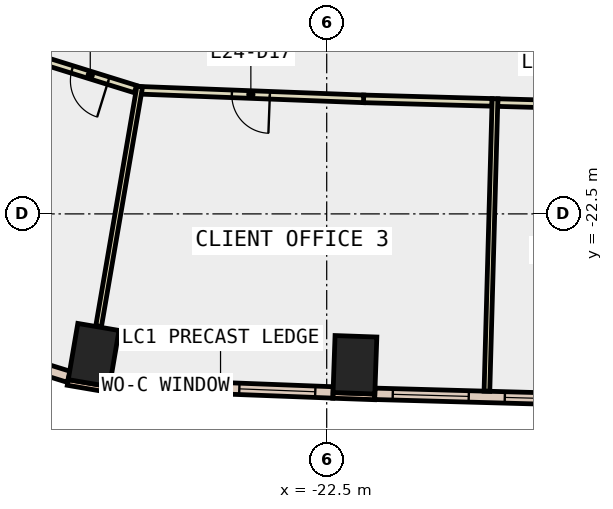
"""IFC4 building model, lengths in metres.
Left out: names, types, materials, properties, quantities, classifications, styles, units other than length and angle.
Written with IfcOpenShell. Run it as: python <this file> out.ifc"""

import sys

from ifc_helpers import new_model, si_unit, direction, frame, frame_2d, origin, origin_2d, place, context, subcontext, project, spatial, rectangle, extrude, element, fill, save


model = new_model("IFC4")
c1 = context("Model", 3, precision=1e-05, world=origin(), true_north=direction((0.0, 1.0)))
c2 = subcontext(c1, "Body", "Model", "MODEL_VIEW")
j1 = project(units=[si_unit("LENGTHUNIT", "METRE"), si_unit("PLANEANGLEUNIT", "RADIAN")], contexts=[c1])
p1 = place(None, origin())
s1 = spatial("IfcSite", under=j1, at=p1, CompositionType="ELEMENT")
p2 = place(p1, origin())
s2 = spatial("IfcBuilding", under=s1, at=p2, CompositionType="ELEMENT")
p3 = place(p2, frame((0.0, 0.0, 111.8)))
s3 = spatial("IfcBuildingStorey", under=s2, at=p3, CompositionType="ELEMENT", Elevation=111.8)
for number, where, z_axis, x_axis in (
    (1, (-28.633, -26.214, -0.4), (0.0, 0.0, 1.0), (-0.986, 0.168, 0.0)),
    (2, (-21.757, -26.47, -0.4), (0.0, 0.0, 1.0), (-0.999, 0.035, 0.0)),
):
    element("IfcColumn", number, at=place(p3, frame(where, z_axis=z_axis, x_axis=x_axis)), inside=s3, PredefinedType="COLUMN", context=c2, shape_type="SweptSolid", body=[
        extrude(rectangle(XDim=1.1, YDim=1.5, at=origin_2d()), origin(), (0.0, 0.0, 1.0), 4.2),
    ])
p4 = place(p3, frame((-29.314, -26.935, 0.0), z_axis=(0.0, 0.0, 1.0), x_axis=(0.985763338892, -0.168138751323, 0.0)))
e3 = element("IfcWall", 3, at=p4, inside=s3, PredefinedType="STANDARD", context=c2, shape_type="SweptSolid", body=[
    extrude(rectangle(XDim=1.101, YDim=0.15, at=frame_2d((0.55, 0.0))), origin(), (0.0, 0.0, 1.0), 3.8),
])
p5 = place(p3, frame((-22.336, -27.275, 0.0), z_axis=(0.0, 0.0, 1.0), x_axis=(0.999368780235, -0.035525217693, 0.0)))
e4 = element("IfcWall", 4, at=p5, inside=s3, PredefinedType="STANDARD", context=c2, shape_type="SweptSolid", body=[
    extrude(rectangle(XDim=1.1, YDim=0.15, at=frame_2d((0.55, 0.0))), origin(), (0.0, 0.0, 1.0), 3.8),
])
p6 = place(p3, frame((-28.205, -26.973, 0.0), z_axis=(0.0, 0.0, 1.0), x_axis=(0.999266319694, -0.03829911651, 0.0)))
e5 = element("IfcWall", 5, at=p6, inside=s3, PredefinedType="STANDARD", context=c2, shape_type="SweptSolid", body=[
    extrude(rectangle(XDim=5.877, YDim=0.3, at=frame_2d((2.939, 0.0))), origin(), (0.0, 0.0, 1.0), 3.8),
])
p7 = place(p6, frame((0.469, 0.0, 0.9)))
e6 = element("IfcOpeningElement", 6, at=p7, cuts=e5, PredefinedType="OPENING", context=c2, shape_type="SweptSolid", body=[
    extrude(rectangle(XDim=2.0, YDim=2.6, at=frame_2d((1.0, 1.3))), frame((0.0, 0.16, 0.0), z_axis=(0.0, -1.0, 0.0), x_axis=(1.0, 0.0, 0.0)), (0.0, 0.0, 1.0), 0.32),
])
p8 = place(p6, frame((3.408, 0.0, 0.9)))
e7 = element("IfcOpeningElement", 7, at=p8, cuts=e5, PredefinedType="OPENING", context=c2, shape_type="SweptSolid", body=[
    extrude(rectangle(XDim=2.0, YDim=2.6, at=frame_2d((1.0, 1.3))), frame((0.0, 0.16, 0.0), z_axis=(0.0, -1.0, 0.0), x_axis=(1.0, 0.0, 0.0)), (0.0, 0.0, 1.0), 0.32),
])
p9 = place(p3, frame((-21.235, -27.234, 0.0), z_axis=(0.0, 0.0, 1.0), x_axis=(0.999617542368, -0.027654456983, 0.0)))
e8 = element("IfcWall", 8, at=p9, inside=s3, PredefinedType="STANDARD", context=c2, shape_type="SweptSolid", body=[
    extrude(rectangle(XDim=5.897, YDim=0.3, at=frame_2d((2.949, 0.0))), origin(), (0.0, 0.0, 1.0), 3.8),
])
p10 = place(p9, frame((0.474, 0.0, 0.9)))
e9 = element("IfcOpeningElement", 9, at=p10, cuts=e8, PredefinedType="OPENING", context=c2, shape_type="SweptSolid", body=[
    extrude(rectangle(XDim=2.0, YDim=2.6, at=frame_2d((1.0, 1.3))), frame((0.0, 0.16, 0.0), z_axis=(0.0, -1.0, 0.0), x_axis=(1.0, 0.0, 0.0)), (0.0, 0.0, 1.0), 0.32),
])
p11 = place(p9, frame((3.423, 0.0, 0.9)))
e10 = element("IfcOpeningElement", 10, at=p11, cuts=e8, PredefinedType="OPENING", context=c2, shape_type="SweptSolid", body=[
    extrude(rectangle(XDim=2.0, YDim=2.6, at=frame_2d((1.0, 1.3))), frame((0.0, 0.16, 0.0), z_axis=(0.0, -1.0, 0.0), x_axis=(1.0, 0.0, 0.0)), (0.0, 0.0, 1.0), 0.32),
])
p12 = place(p3, frame((-33.294, -25.542, 0.0), z_axis=(0.0, 0.0, 1.0), x_axis=(0.954955020021, -0.296750585066, 0.0)))
e11 = element("IfcWall", 11, at=p12, inside=s3, PredefinedType="STANDARD", context=c2, shape_type="SweptSolid", body=[
    extrude(rectangle(XDim=4.196, YDim=0.3, at=frame_2d((2.098, 0.0))), origin(), (0.0, 0.0, 1.0), 3.8),
])
p13 = place(p12, frame((1.398, 0.0, 0.9)))
e12 = element("IfcOpeningElement", 12, at=p13, cuts=e11, PredefinedType="OPENING", context=c2, shape_type="SweptSolid", body=[
    extrude(rectangle(XDim=1.4, YDim=2.6, at=frame_2d((0.7, 1.3))), frame((0.0, 0.16, 0.0), z_axis=(0.0, -1.0, 0.0), x_axis=(1.0, 0.0, 0.0)), (0.0, 0.0, 1.0), 0.32),
])
p14 = place(p3, frame((-27.533, -19.217, 0.0), z_axis=(0.0, 0.0, 1.0), x_axis=(-0.954946345159, 0.296778499671, 0.0)))
e13 = element("IfcWall", 13, at=p14, inside=s3, PredefinedType="PARTITIONING", context=c2, shape_type="SweptSolid", body=[
    extrude(rectangle(XDim=2.49, YDim=0.2, at=frame_2d((1.245, 0.0))), origin(), (0.0, 0.0, 1.0), 3.8),
])
p15 = place(p14, frame((0.745, 0.0, 0.0)))
e14 = element("IfcOpeningElement", 14, at=p15, cuts=e13, PredefinedType="OPENING", context=c2, shape_type="SweptSolid", body=[
    extrude(rectangle(XDim=1.0, YDim=2.1, at=frame_2d((0.5, 1.05))), frame((0.0, 0.11, 0.0), z_axis=(0.0, -1.0, 0.0), x_axis=(1.0, 0.0, 0.0)), (0.0, 0.0, 1.0), 0.22),
])
p16 = place(p3, frame((-18.149, -19.566, 0.0), z_axis=(0.0, 0.0, 1.0), x_axis=(-0.999621568347, 0.027508545868, 0.0)))
e15 = element("IfcWall", 15, at=p16, inside=s3, PredefinedType="PARTITIONING", context=c2, shape_type="SweptSolid", body=[
    extrude(rectangle(XDim=3.381, YDim=0.2, at=frame_2d((1.691, 0.0))), origin(), (0.0, 0.0, 1.0), 3.8),
])
p17 = place(p3, frame((-21.529, -19.473, 0.0), z_axis=(0.0, 0.0, 1.0), x_axis=(-0.999270076349, 0.038200975307, 0.0)))
e16 = element("IfcWall", 16, at=p17, inside=s3, PredefinedType="PARTITIONING", context=c2, shape_type="SweptSolid", body=[
    extrude(rectangle(XDim=5.937, YDim=0.2, at=frame_2d((2.969, 0.0))), origin(), (0.0, 0.0, 1.0), 3.8),
])
p18 = place(p17, frame((2.469, 0.0, 0.0)))
e17 = element("IfcOpeningElement", 17, at=p18, cuts=e16, PredefinedType="OPENING", context=c2, shape_type="SweptSolid", body=[
    extrude(rectangle(XDim=1.0, YDim=2.1, at=frame_2d((0.5, 1.05))), frame((0.0, 0.11, 0.0), z_axis=(0.0, -1.0, 0.0), x_axis=(1.0, 0.0, 0.0)), (0.0, 0.0, 1.0), 0.22),
])
p19 = place(p3, frame((-14.618, -19.664, 0.0), z_axis=(0.0, 0.0, 1.0), x_axis=(-0.999621786796, 0.027500606598, 0.0)))
e18 = element("IfcWall", 18, at=p19, inside=s3, PredefinedType="PARTITIONING", context=c2, shape_type="SweptSolid", body=[
    extrude(rectangle(XDim=3.382, YDim=0.2, at=frame_2d((1.691, 0.0))), origin(), (0.0, 0.0, 1.0), 3.8),
])
p20 = place(p19, frame((1.191, 0.0, 0.0)))
e19 = element("IfcOpeningElement", 19, at=p20, cuts=e18, PredefinedType="OPENING", context=c2, shape_type="SweptSolid", body=[
    extrude(rectangle(XDim=1.0, YDim=2.1, at=frame_2d((0.5, 1.05))), frame((0.0, 0.11, 0.0), z_axis=(0.0, -1.0, 0.0), x_axis=(1.0, 0.0, 0.0)), (0.0, 0.0, 1.0), 0.22),
])
p21 = place(p3, frame((-27.42, -19.148, 0.0), z_axis=(0.0, 0.0, 1.0), x_axis=(-0.169086648341, -0.985601189809, 0.0)))
e20 = element("IfcWall", 20, at=p21, inside=s3, PredefinedType="PARTITIONING", context=c2, shape_type="SweptSolid", body=[
    extrude(rectangle(XDim=6.399, YDim=0.15, at=frame_2d((3.2, 0.0))), origin(), (0.0, 0.0, 1.0), 3.8),
])
p22 = place(p3, frame((-18.071, -19.469, 0.0), z_axis=(0.0, 0.0, 1.0), x_axis=(-0.027648258523, -0.999617713829, 0.0)))
e21 = element("IfcWall", 21, at=p22, inside=s3, PredefinedType="PARTITIONING", context=c2, shape_type="SweptSolid", body=[
    extrude(rectangle(XDim=7.7, YDim=0.15, at=frame_2d((3.85, 0.0))), origin(), (0.0, 0.0, 1.0), 3.8),
])
p23 = place(p7, origin())
e22 = element("IfcWindow", 22, at=p23, inside=s3, PartitioningType="SINGLE_PANEL", PredefinedType="WINDOW", context=c2, shape_type="SweptSolid", body=[
    extrude(rectangle(XDim=2.0, YDim=2.6, at=frame_2d((1.0, 1.3))), frame((0.0, 0.03, 0.0), z_axis=(0.0, -1.0, 0.0), x_axis=(1.0, 0.0, 0.0)), (0.0, 0.0, 1.0), 0.06),
])
fill(e6, e22)
p24 = place(p8, origin())
e23 = element("IfcWindow", 23, at=p24, inside=s3, PartitioningType="SINGLE_PANEL", PredefinedType="WINDOW", context=c2, shape_type="SweptSolid", body=[
    extrude(rectangle(XDim=2.0, YDim=2.6, at=frame_2d((1.0, 1.3))), frame((0.0, 0.03, 0.0), z_axis=(0.0, -1.0, 0.0), x_axis=(1.0, 0.0, 0.0)), (0.0, 0.0, 1.0), 0.06),
])
fill(e7, e23)
p25 = place(p10, origin())
e24 = element("IfcWindow", 24, at=p25, inside=s3, PartitioningType="SINGLE_PANEL", PredefinedType="WINDOW", context=c2, shape_type="SweptSolid", body=[
    extrude(rectangle(XDim=2.0, YDim=2.6, at=frame_2d((1.0, 1.3))), frame((0.0, 0.03, 0.0), z_axis=(0.0, -1.0, 0.0), x_axis=(1.0, 0.0, 0.0)), (0.0, 0.0, 1.0), 0.06),
])
fill(e9, e24)
p26 = place(p11, origin())
e25 = element("IfcWindow", 25, at=p26, inside=s3, PartitioningType="SINGLE_PANEL", PredefinedType="WINDOW", context=c2, shape_type="SweptSolid", body=[
    extrude(rectangle(XDim=2.0, YDim=2.6, at=frame_2d((1.0, 1.3))), frame((0.0, 0.03, 0.0), z_axis=(0.0, -1.0, 0.0), x_axis=(1.0, 0.0, 0.0)), (0.0, 0.0, 1.0), 0.06),
])
fill(e10, e25)
p27 = place(p15, origin())
e26 = element("IfcDoor", 26, at=p27, inside=s3, OperationType="SINGLE_SWING_LEFT", PredefinedType="DOOR", context=c2, shape_type="SweptSolid", body=[
    extrude(rectangle(XDim=1.0, YDim=2.1, at=frame_2d((0.5, 1.05))), frame((0.0, 0.025, 0.0), z_axis=(0.0, -1.0, 0.0), x_axis=(1.0, 0.0, 0.0)), (0.0, 0.0, 1.0), 0.05),
])
fill(e14, e26)
p28 = place(p18, origin())
e27 = element("IfcDoor", 27, at=p28, inside=s3, OperationType="SINGLE_SWING_LEFT", PredefinedType="DOOR", context=c2, shape_type="SweptSolid", body=[
    extrude(rectangle(XDim=1.0, YDim=2.1, at=frame_2d((0.5, 1.05))), frame((0.0, 0.025, 0.0), z_axis=(0.0, -1.0, 0.0), x_axis=(1.0, 0.0, 0.0)), (0.0, 0.0, 1.0), 0.05),
])
fill(e17, e27)
save(model, sys.argv[1])
